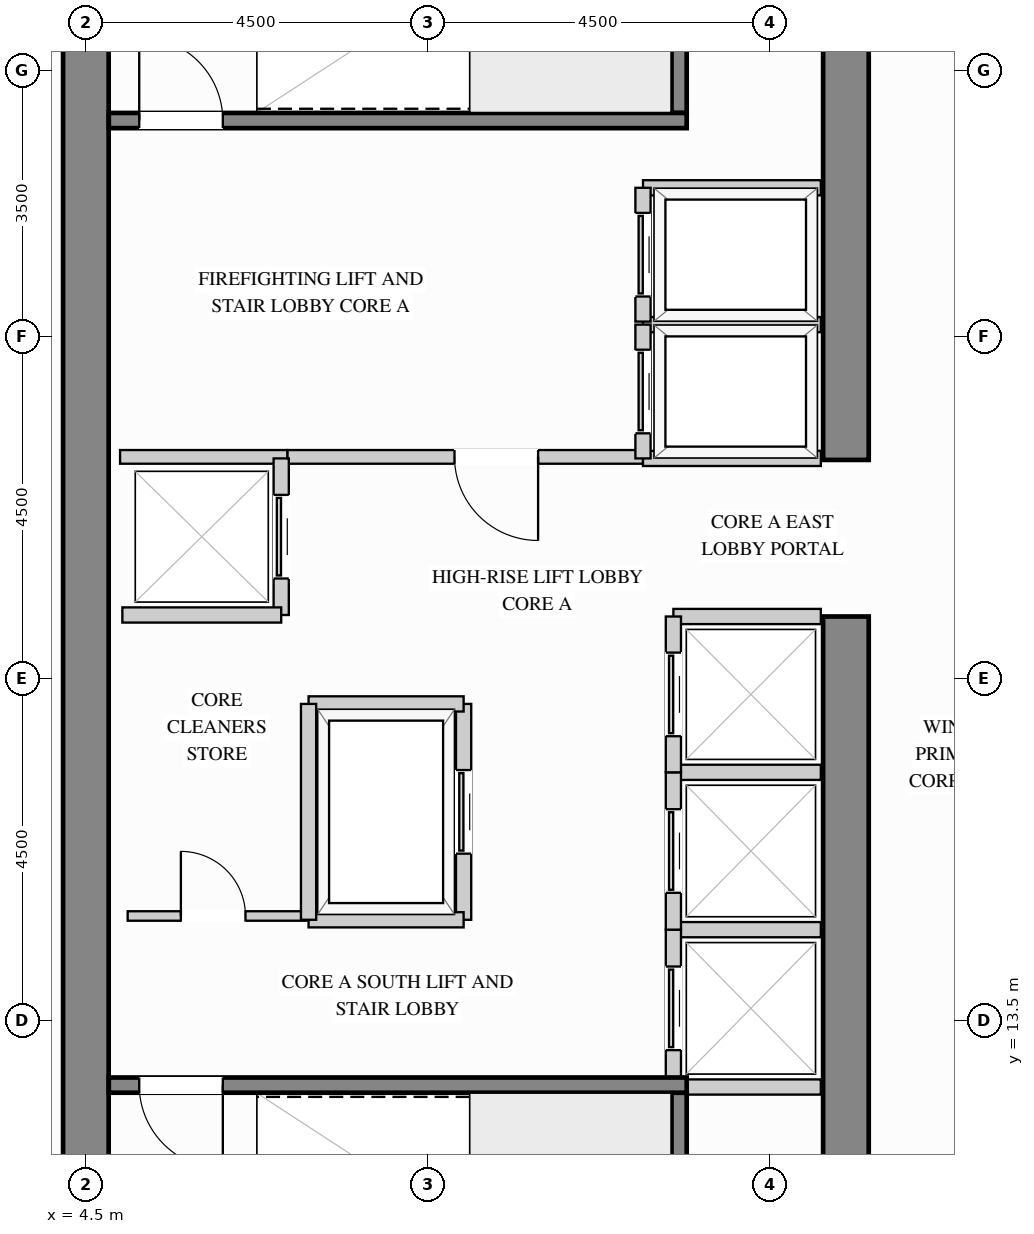
"""IFC4 building model, lengths in metres.
Left out: names, types, materials, properties, quantities, classifications, styles, units other than length and angle.
Written with IfcOpenShell. Run it as: python <this file> out.ifc"""

import sys

from ifc_helpers import new_model, si_unit, direction, frame, frame_2d, origin, place, context, subcontext, project, spatial, rectangle, extrude, source, transform, mapped, element, fill, save


model = new_model("IFC4")
c1 = context("Model", 3, precision=1e-05, world=origin(), true_north=direction((0.0, 1.0)))
c2 = subcontext(c1, "Body", "Model", "MODEL_VIEW")
j1 = project(units=[si_unit("LENGTHUNIT", "METRE"), si_unit("PLANEANGLEUNIT", "RADIAN")], contexts=[c1])
p1 = place(None, origin())
s1 = spatial("IfcSite", under=j1, at=p1, CompositionType="ELEMENT")
p2 = place(p1, origin())
s2 = spatial("IfcBuilding", under=s1, at=p2, CompositionType="ELEMENT")
p3 = place(p2, frame((0.0, 0.0, 168.3)))
s3 = spatial("IfcBuildingStorey", under=s2, at=p3, CompositionType="ELEMENT", Elevation=168.3)
m1 = source(origin(), c2, "Body", "SweptSolid", [
    extrude(rectangle(XDim=10.02, YDim=0.6, at=frame_2d((5.01, 0.0))), origin(), (0.0, 0.0, 1.0), 3.4),
])
p4 = place(p3, frame((14.5, 8.8, 0.0), z_axis=(0.0, 0.0, 1.0), x_axis=(0.0, 1.0, 0.0)))
e1 = element("IfcWall", 1, at=p4, inside=s3, PredefinedType="SHEAR", context=c2, shape_type="MappedRepresentation", body=[
    mapped(m1, transform((0.0, 0.0, 0.0), x_axis=(1.0, 0.0, 0.0), y_axis=(0.0, 1.0, 0.0), z_axis=(0.0, 0.0, 1.0))),
])
m2 = source(origin(), c2, "Body", "SweptSolid", [
    extrude(rectangle(XDim=8.32, YDim=0.6, at=frame_2d((4.16, 0.0))), origin(), (0.0, 0.0, 1.0), 3.4),
])
p5 = place(p3, frame((14.5, 20.88, 0.0), z_axis=(0.0, 0.0, 1.0), x_axis=(0.0, 1.0, 0.0)))
e2 = element("IfcWall", 2, at=p5, inside=s3, PredefinedType="SHEAR", context=c2, shape_type="MappedRepresentation", body=[
    mapped(m2, transform((0.0, 0.0, 0.0), x_axis=(1.0, 0.0, 0.0), y_axis=(0.0, 1.0, 0.0), z_axis=(0.0, 0.0, 1.0))),
])
m3 = source(origin(), c2, "Body", "SweptSolid", [
    extrude(rectangle(XDim=20.4, YDim=0.6, at=frame_2d((10.2, 0.0))), origin(), (0.0, 0.0, 1.0), 3.4),
])
p6 = place(p3, frame((4.5, 8.8, 0.0), z_axis=(0.0, 0.0, 1.0), x_axis=(0.0, 1.0, 0.0)))
e3 = element("IfcWall", 3, at=p6, inside=s3, PredefinedType="SHEAR", context=c2, shape_type="MappedRepresentation", body=[
    mapped(m3, transform((0.0, 0.0, 0.0), x_axis=(1.0, 0.0, 0.0), y_axis=(0.0, 1.0, 0.0), z_axis=(0.0, 0.0, 1.0))),
])
p7 = place(p3, frame((7.15, 20.92, 0.0), z_axis=(0.0, 0.0, 1.0), x_axis=(1.0, 0.0, 0.0)))
e4 = element("IfcWall", 4, at=p7, inside=s3, PredefinedType="PARTITIONING", context=c2, shape_type="SweptSolid", body=[
    extrude(rectangle(XDim=4.68, YDim=0.18, at=frame_2d((2.34, 0.0))), origin(), (0.0, 0.0, 1.0), 3.385),
])
p8 = place(p7, frame((2.2, 0.0, 0.0)))
e5 = element("IfcOpeningElement", 5, at=p8, cuts=e4, PredefinedType="OPENING", context=c2, shape_type="SweptSolid", body=[
    extrude(rectangle(XDim=1.1, YDim=2.15, at=frame_2d((0.55, 1.075))), frame((0.0, 0.1, 0.0), z_axis=(0.0, -1.0, 0.0), x_axis=(1.0, 0.0, 0.0)), (0.0, 0.0, 1.0), 0.2),
])
m4 = source(origin(), c2, "Body", "SweptSolid", [
    extrude(rectangle(XDim=2.2, YDim=0.18, at=frame_2d((1.1, 0.0))), origin(), (0.0, 0.0, 1.0), 3.385),
])
p9 = place(p3, frame((4.95, 20.92, 0.0), z_axis=(0.0, 0.0, 1.0), x_axis=(1.0, 0.0, 0.0)))
e6 = element("IfcWall", 6, at=p9, inside=s3, PredefinedType="PARTITIONING", context=c2, shape_type="MappedRepresentation", body=[
    mapped(m4, transform((0.0, 0.0, 0.0), x_axis=(1.0, 0.0, 0.0), y_axis=(0.0, 1.0, 0.0), z_axis=(0.0, 0.0, 1.0))),
])
p10 = place(p3, frame((5.05, 14.88, 0.0), z_axis=(0.0, 0.0, 1.0), x_axis=(1.0, 0.0, 0.0)))
e7 = element("IfcWall", 7, at=p10, inside=s3, PredefinedType="PARTITIONING", context=c2, shape_type="SweptSolid", body=[
    extrude(rectangle(XDim=2.35, YDim=0.125, at=frame_2d((1.175, 0.0))), origin(), (0.0, 0.0, 1.0), 3.385),
])
p11 = place(p10, frame((0.7, 0.0, 0.0)))
e8 = element("IfcOpeningElement", 8, at=p11, cuts=e7, PredefinedType="OPENING", context=c2, shape_type="SweptSolid", body=[
    extrude(rectangle(XDim=0.85, YDim=2.1, at=frame_2d((0.425, 1.05))), frame((0.0, 0.073, 0.0), z_axis=(0.0, -1.0, 0.0), x_axis=(1.0, 0.0, 0.0)), (0.0, 0.0, 1.0), 0.145),
])
m5 = source(origin(), c2, "Body", "SweptSolid", [
    extrude(rectangle(XDim=2.34, YDim=0.2, at=frame_2d((1.17, 0.0))), origin(), (0.0, 0.0, 1.0), 3.385),
])
for number, where, z_axis, x_axis in (
    (9, (11.83, 22.66, 0.0), (0.0, 0.0, 1.0), (1.0, 0.0, 0.0)),
    (10, (11.83, 20.9, 0.0), (0.0, 0.0, 1.0), (1.0, 0.0, 0.0)),
):
    element("IfcWall", number, at=place(p3, frame(where, z_axis=z_axis, x_axis=x_axis)), inside=s3, PredefinedType="PARTITIONING", context=c2, shape_type="MappedRepresentation", body=[
        mapped(m5, transform((0.0, 0.0, 0.0), x_axis=(1.0, 0.0, 0.0), y_axis=(0.0, 1.0, 0.0), z_axis=(0.0, 0.0, 1.0))),
    ])
p12 = place(p3, frame((11.83, 20.9, 0.0), z_axis=(0.0, 0.0, 1.0), x_axis=(0.0, 1.0, 0.0)))
e11 = element("IfcWall", 11, at=p12, inside=s3, PredefinedType="PARTITIONING", context=c2, shape_type="SweptSolid", body=[
    extrude(rectangle(XDim=1.76, YDim=0.2, at=frame_2d((0.88, 0.0))), origin(), (0.0, 0.0, 1.0), 3.385),
])
p13 = place(p12, frame((0.33, 0.0, 0.0)))
e12 = element("IfcOpeningElement", 12, at=p13, cuts=e11, PredefinedType="OPENING", context=c2, shape_type="SweptSolid", body=[
    extrude(rectangle(XDim=1.1, YDim=2.2, at=frame_2d((0.55, 1.1))), frame((0.0, 0.11, 0.0), z_axis=(0.0, -1.0, 0.0), x_axis=(1.0, 0.0, 0.0)), (0.0, 0.0, 1.0), 0.22),
])
p14 = place(p3, frame((11.83, 24.46, 0.0), z_axis=(0.0, 0.0, 1.0), x_axis=(1.0, 0.0, 0.0)))
e13 = element("IfcWall", 13, at=p14, inside=s3, PredefinedType="PARTITIONING", context=c2, shape_type="MappedRepresentation", body=[
    mapped(m5, transform((0.0, 0.0, 0.0), x_axis=(1.0, 0.0, 0.0), y_axis=(0.0, 1.0, 0.0), z_axis=(0.0, 0.0, 1.0))),
])
p15 = place(p3, frame((11.83, 22.7, 0.0), z_axis=(0.0, 0.0, 1.0), x_axis=(0.0, 1.0, 0.0)))
e14 = element("IfcWall", 14, at=p15, inside=s3, PredefinedType="PARTITIONING", context=c2, shape_type="SweptSolid", body=[
    extrude(rectangle(XDim=1.76, YDim=0.2, at=frame_2d((0.88, 0.0))), origin(), (0.0, 0.0, 1.0), 3.385),
])
p16 = place(p15, frame((0.33, 0.0, 0.0)))
e15 = element("IfcOpeningElement", 15, at=p16, cuts=e14, PredefinedType="OPENING", context=c2, shape_type="SweptSolid", body=[
    extrude(rectangle(XDim=1.1, YDim=2.2, at=frame_2d((0.55, 1.1))), frame((0.0, 0.11, 0.0), z_axis=(0.0, -1.0, 0.0), x_axis=(1.0, 0.0, 0.0)), (0.0, 0.0, 1.0), 0.22),
])
m6 = source(origin(), c2, "Body", "SweptSolid", [
    extrude(rectangle(XDim=1.94, YDim=0.2, at=frame_2d((0.97, 0.0))), origin(), (0.0, 0.0, 1.0), 3.385),
])
for number, where, z_axis, x_axis in (
    (16, (12.23, 14.7, 0.0), (0.0, 0.0, 1.0), (1.0, 0.0, 0.0)),
    (17, (12.23, 12.63, 0.0), (0.0, 0.0, 1.0), (1.0, 0.0, 0.0)),
):
    element("IfcWall", number, at=place(p3, frame(where, z_axis=z_axis, x_axis=x_axis)), inside=s3, PredefinedType="PARTITIONING", context=c2, shape_type="MappedRepresentation", body=[
        mapped(m6, transform((0.0, 0.0, 0.0), x_axis=(1.0, 0.0, 0.0), y_axis=(0.0, 1.0, 0.0), z_axis=(0.0, 0.0, 1.0))),
    ])
p17 = place(p3, frame((12.23, 12.63, 0.0), z_axis=(0.0, 0.0, 1.0), x_axis=(0.0, 1.0, 0.0)))
e18 = element("IfcWall", 18, at=p17, inside=s3, PredefinedType="PARTITIONING", context=c2, shape_type="SweptSolid", body=[
    extrude(rectangle(XDim=2.07, YDim=0.2, at=frame_2d((1.035, 0.0))), origin(), (0.0, 0.0, 1.0), 3.385),
])
p18 = place(p17, frame((0.485, 0.0, 0.0)))
e19 = element("IfcOpeningElement", 19, at=p18, cuts=e18, PredefinedType="OPENING", context=c2, shape_type="SweptSolid", body=[
    extrude(rectangle(XDim=1.1, YDim=2.2, at=frame_2d((0.55, 1.1))), frame((0.0, 0.11, 0.0), z_axis=(0.0, -1.0, 0.0), x_axis=(1.0, 0.0, 0.0)), (0.0, 0.0, 1.0), 0.22),
])
p19 = place(p3, frame((12.23, 16.77, 0.0), z_axis=(0.0, 0.0, 1.0), x_axis=(1.0, 0.0, 0.0)))
e20 = element("IfcWall", 20, at=p19, inside=s3, PredefinedType="PARTITIONING", context=c2, shape_type="MappedRepresentation", body=[
    mapped(m6, transform((0.0, 0.0, 0.0), x_axis=(1.0, 0.0, 0.0), y_axis=(0.0, 1.0, 0.0), z_axis=(0.0, 0.0, 1.0))),
])
p20 = place(p3, frame((12.23, 14.7, 0.0), z_axis=(0.0, 0.0, 1.0), x_axis=(0.0, 1.0, 0.0)))
e21 = element("IfcWall", 21, at=p20, inside=s3, PredefinedType="PARTITIONING", context=c2, shape_type="SweptSolid", body=[
    extrude(rectangle(XDim=2.07, YDim=0.2, at=frame_2d((1.035, 0.0))), origin(), (0.0, 0.0, 1.0), 3.385),
])
p21 = place(p20, frame((0.485, 0.0, 0.0)))
e22 = element("IfcOpeningElement", 22, at=p21, cuts=e21, PredefinedType="OPENING", context=c2, shape_type="SweptSolid", body=[
    extrude(rectangle(XDim=1.1, YDim=2.2, at=frame_2d((0.55, 1.1))), frame((0.0, 0.11, 0.0), z_axis=(0.0, -1.0, 0.0), x_axis=(1.0, 0.0, 0.0)), (0.0, 0.0, 1.0), 0.22),
])
p22 = place(p3, frame((12.23, 18.82, 0.0), z_axis=(0.0, 0.0, 1.0), x_axis=(1.0, 0.0, 0.0)))
e23 = element("IfcWall", 23, at=p22, inside=s3, PredefinedType="PARTITIONING", context=c2, shape_type="MappedRepresentation", body=[
    mapped(m6, transform((0.0, 0.0, 0.0), x_axis=(1.0, 0.0, 0.0), y_axis=(0.0, 1.0, 0.0), z_axis=(0.0, 0.0, 1.0))),
])
p23 = place(p3, frame((12.23, 16.77, 0.0), z_axis=(0.0, 0.0, 1.0), x_axis=(0.0, 1.0, 0.0)))
e24 = element("IfcWall", 24, at=p23, inside=s3, PredefinedType="PARTITIONING", context=c2, shape_type="SweptSolid", body=[
    extrude(rectangle(XDim=2.05, YDim=0.2, at=frame_2d((1.025, 0.0))), origin(), (0.0, 0.0, 1.0), 3.385),
])
p24 = place(p23, frame((0.475, 0.0, 0.0)))
e25 = element("IfcOpeningElement", 25, at=p24, cuts=e24, PredefinedType="OPENING", context=c2, shape_type="SweptSolid", body=[
    extrude(rectangle(XDim=1.1, YDim=2.2, at=frame_2d((0.55, 1.1))), frame((0.0, 0.11, 0.0), z_axis=(0.0, -1.0, 0.0), x_axis=(1.0, 0.0, 0.0)), (0.0, 0.0, 1.0), 0.22),
])
p25 = place(p3, frame((7.07, 18.84, 0.0), z_axis=(0.0, 0.0, 1.0), x_axis=(0.0, 1.0, 0.0)))
e26 = element("IfcWall", 26, at=p25, inside=s3, PredefinedType="PARTITIONING", context=c2, shape_type="SweptSolid", body=[
    extrude(rectangle(XDim=2.06, YDim=0.2, at=frame_2d((1.03, 0.0))), origin(), (0.0, 0.0, 1.0), 3.385),
])
p26 = place(p25, frame((0.48, 0.0, 0.0)))
e27 = element("IfcOpeningElement", 27, at=p26, cuts=e26, PredefinedType="OPENING", context=c2, shape_type="SweptSolid", body=[
    extrude(rectangle(XDim=1.1, YDim=2.2, at=frame_2d((0.55, 1.1))), frame((0.0, 0.11, 0.0), z_axis=(0.0, -1.0, 0.0), x_axis=(1.0, 0.0, 0.0)), (0.0, 0.0, 1.0), 0.22),
])
m7 = source(origin(), c2, "Body", "SweptSolid", [
    extrude(rectangle(XDim=2.09, YDim=0.2, at=frame_2d((1.045, 0.0))), origin(), (0.0, 0.0, 1.0), 3.385),
])
p27 = place(p3, frame((4.98, 18.84, 0.0), z_axis=(0.0, 0.0, 1.0), x_axis=(1.0, 0.0, 0.0)))
e28 = element("IfcWall", 28, at=p27, inside=s3, PredefinedType="PARTITIONING", context=c2, shape_type="MappedRepresentation", body=[
    mapped(m7, transform((0.0, 0.0, 0.0), x_axis=(1.0, 0.0, 0.0), y_axis=(0.0, 1.0, 0.0), z_axis=(0.0, 0.0, 1.0))),
])
p28 = place(p3, frame((9.47, 14.83, 0.0), z_axis=(0.0, 0.0, 1.0), x_axis=(0.0, 1.0, 0.0)))
e29 = element("IfcWall", 29, at=p28, inside=s3, PredefinedType="PARTITIONING", context=c2, shape_type="SweptSolid", body=[
    extrude(rectangle(XDim=2.84, YDim=0.2, at=frame_2d((1.42, 0.0))), origin(), (0.0, 0.0, 1.0), 3.385),
])
p29 = place(p28, frame((0.87, 0.0, 0.0)))
e30 = element("IfcOpeningElement", 30, at=p29, cuts=e29, PredefinedType="OPENING", context=c2, shape_type="SweptSolid", body=[
    extrude(rectangle(XDim=1.1, YDim=2.2, at=frame_2d((0.55, 1.1))), frame((0.0, 0.11, 0.0), z_axis=(0.0, -1.0, 0.0), x_axis=(1.0, 0.0, 0.0)), (0.0, 0.0, 1.0), 0.22),
])
m8 = source(origin(), c2, "Body", "SweptSolid", [
    extrude(rectangle(XDim=2.04, YDim=0.2, at=frame_2d((1.02, 0.0))), origin(), (0.0, 0.0, 1.0), 3.385),
])
for number, where, z_axis, x_axis in (
    (31, (7.43, 17.67, 0.0), (0.0, 0.0, 1.0), (1.0, 0.0, 0.0)),
    (32, (7.43, 14.83, 0.0), (0.0, 0.0, 1.0), (1.0, 0.0, 0.0)),
):
    element("IfcWall", number, at=place(p3, frame(where, z_axis=z_axis, x_axis=x_axis)), inside=s3, PredefinedType="PARTITIONING", context=c2, shape_type="MappedRepresentation", body=[
        mapped(m8, transform((0.0, 0.0, 0.0), x_axis=(1.0, 0.0, 0.0), y_axis=(0.0, 1.0, 0.0), z_axis=(0.0, 0.0, 1.0))),
    ])
m9 = source(origin(), c2, "Body", "SweptSolid", [
    extrude(rectangle(XDim=2.84, YDim=0.2, at=frame_2d((1.42, 0.0))), origin(), (0.0, 0.0, 1.0), 3.385),
])
p30 = place(p3, frame((7.43, 14.83, 0.0), z_axis=(0.0, 0.0, 1.0), x_axis=(0.0, 1.0, 0.0)))
e33 = element("IfcWall", 33, at=p30, inside=s3, PredefinedType="PARTITIONING", context=c2, shape_type="MappedRepresentation", body=[
    mapped(m9, transform((0.0, 0.0, 0.0), x_axis=(1.0, 0.0, 0.0), y_axis=(0.0, 1.0, 0.0), z_axis=(0.0, 0.0, 1.0))),
])
m10 = source(origin(), c2, "Body", "SweptSolid", [
    extrude(rectangle(XDim=3.753, YDim=0.2, at=frame_2d((1.876, 0.0))), origin(), (0.0, 0.0, 1.0), 3.4),
])
p31 = place(p3, frame((12.305, 8.802, 0.0), z_axis=(0.0, 0.0, 1.0), x_axis=(0.0, 1.0, 0.0)))
e34 = element("IfcWall", 34, at=p31, inside=s3, PredefinedType="SHEAR", context=c2, shape_type="MappedRepresentation", body=[
    mapped(m10, transform((0.0, 0.0, 0.0), x_axis=(1.0, 0.0, 0.0), y_axis=(0.0, 1.0, 0.0), z_axis=(0.0, 0.0, 1.0))),
])
p32 = place(p3, frame((4.802, 12.655, 0.0), z_axis=(0.0, 0.0, 1.0), x_axis=(1.0, 0.0, 0.0)))
e35 = element("IfcWall", 35, at=p32, inside=s3, PredefinedType="SHEAR", context=c2, shape_type="SweptSolid", body=[
    extrude(rectangle(XDim=7.603, YDim=0.2, at=frame_2d((3.802, 0.0))), origin(), (0.0, 0.0, 1.0), 3.4),
])
p33 = place(p32, frame((0.4, 0.0, 0.0)))
e36 = element("IfcOpeningElement", 36, at=p33, cuts=e35, PredefinedType="OPENING", context=c2, shape_type="SweptSolid", body=[
    extrude(rectangle(XDim=1.1, YDim=2.15, at=frame_2d((0.55, 1.075))), frame((0.0, 0.11, 0.0), z_axis=(0.0, -1.0, 0.0), x_axis=(1.0, 0.0, 0.0)), (0.0, 0.0, 1.0), 0.22),
])
p34 = place(p3, frame((12.305, 25.445, 0.0), z_axis=(0.0, 0.0, 1.0), x_axis=(0.0, 1.0, 0.0)))
e37 = element("IfcWall", 37, at=p34, inside=s3, PredefinedType="SHEAR", context=c2, shape_type="MappedRepresentation", body=[
    mapped(m10, transform((0.0, 0.0, 0.0), x_axis=(1.0, 0.0, 0.0), y_axis=(0.0, 1.0, 0.0), z_axis=(0.0, 0.0, 1.0))),
])
p35 = place(p3, frame((4.802, 25.345, 0.0), z_axis=(0.0, 0.0, 1.0), x_axis=(1.0, 0.0, 0.0)))
e38 = element("IfcWall", 38, at=p35, inside=s3, PredefinedType="SHEAR", context=c2, shape_type="SweptSolid", body=[
    extrude(rectangle(XDim=7.603, YDim=0.2, at=frame_2d((3.802, 0.0))), origin(), (0.0, 0.0, 1.0), 3.4),
])
p36 = place(p35, frame((0.4, 0.0, 0.0)))
e39 = element("IfcOpeningElement", 39, at=p36, cuts=e38, PredefinedType="OPENING", context=c2, shape_type="SweptSolid", body=[
    extrude(rectangle(XDim=1.1, YDim=2.15, at=frame_2d((0.55, 1.075))), frame((0.0, 0.11, 0.0), z_axis=(0.0, -1.0, 0.0), x_axis=(1.0, 0.0, 0.0)), (0.0, 0.0, 1.0), 0.22),
])
m11 = source(origin(), c2, "Body", "SweptSolid", [
    extrude(rectangle(XDim=1.1, YDim=2.15, at=frame_2d((0.55, 1.075))), frame((0.0, 0.025, 0.0), z_axis=(0.0, -1.0, 0.0), x_axis=(1.0, 0.0, 0.0)), (0.0, 0.0, 1.0), 0.05),
])
p37 = place(p8, origin())
e40 = element("IfcDoor", 40, at=p37, inside=s3, OperationType="SINGLE_SWING_RIGHT", PredefinedType="DOOR", context=c2, shape_type="MappedRepresentation", body=[
    mapped(m11, transform((0.0, 0.0, 0.0), x_axis=(1.0, 0.0, 0.0), y_axis=(0.0, 1.0, 0.0), z_axis=(0.0, 0.0, 1.0))),
])
fill(e5, e40)
m12 = source(origin(), c2, "Body", "SweptSolid", [
    extrude(rectangle(XDim=1.1, YDim=2.2, at=frame_2d((0.55, 1.1))), frame((0.0, 0.025, 0.0), z_axis=(0.0, -1.0, 0.0), x_axis=(1.0, 0.0, 0.0)), (0.0, 0.0, 1.0), 0.05),
])
p38 = place(p13, origin())
e41 = element("IfcDoor", 41, at=p38, inside=s3, OperationType="SLIDING_TO_LEFT", PredefinedType="DOOR", context=c2, shape_type="MappedRepresentation", body=[
    mapped(m12, transform((0.0, 0.0, 0.0), x_axis=(1.0, 0.0, 0.0), y_axis=(0.0, 1.0, 0.0), z_axis=(0.0, 0.0, 1.0))),
])
fill(e12, e41)
p39 = place(p16, origin())
e42 = element("IfcDoor", 42, at=p39, inside=s3, OperationType="SLIDING_TO_LEFT", PredefinedType="DOOR", context=c2, shape_type="MappedRepresentation", body=[
    mapped(m12, transform((0.0, 0.0, 0.0), x_axis=(1.0, 0.0, 0.0), y_axis=(0.0, 1.0, 0.0), z_axis=(0.0, 0.0, 1.0))),
])
fill(e15, e42)
p40 = place(p18, origin())
e43 = element("IfcDoor", 43, at=p40, inside=s3, OperationType="SLIDING_TO_LEFT", PredefinedType="DOOR", context=c2, shape_type="MappedRepresentation", body=[
    mapped(m12, transform((0.0, 0.0, 0.0), x_axis=(1.0, 0.0, 0.0), y_axis=(0.0, 1.0, 0.0), z_axis=(0.0, 0.0, 1.0))),
])
fill(e19, e43)
p41 = place(p21, origin())
e44 = element("IfcDoor", 44, at=p41, inside=s3, OperationType="SLIDING_TO_LEFT", PredefinedType="DOOR", context=c2, shape_type="MappedRepresentation", body=[
    mapped(m12, transform((0.0, 0.0, 0.0), x_axis=(1.0, 0.0, 0.0), y_axis=(0.0, 1.0, 0.0), z_axis=(0.0, 0.0, 1.0))),
])
fill(e22, e44)
p42 = place(p24, origin())
e45 = element("IfcDoor", 45, at=p42, inside=s3, OperationType="SLIDING_TO_LEFT", PredefinedType="DOOR", context=c2, shape_type="MappedRepresentation", body=[
    mapped(m12, transform((0.0, 0.0, 0.0), x_axis=(1.0, 0.0, 0.0), y_axis=(0.0, 1.0, 0.0), z_axis=(0.0, 0.0, 1.0))),
])
fill(e25, e45)
p43 = place(p26, origin())
e46 = element("IfcDoor", 46, at=p43, inside=s3, OperationType="SLIDING_TO_LEFT", PredefinedType="DOOR", context=c2, shape_type="MappedRepresentation", body=[
    mapped(m12, transform((0.0, 0.0, 0.0), x_axis=(1.0, 0.0, 0.0), y_axis=(0.0, 1.0, 0.0), z_axis=(0.0, 0.0, 1.0))),
])
fill(e27, e46)
p44 = place(p29, origin())
e47 = element("IfcDoor", 47, at=p44, inside=s3, OperationType="SLIDING_TO_LEFT", PredefinedType="DOOR", context=c2, shape_type="MappedRepresentation", body=[
    mapped(m12, transform((0.0, 0.0, 0.0), x_axis=(1.0, 0.0, 0.0), y_axis=(0.0, 1.0, 0.0), z_axis=(0.0, 0.0, 1.0))),
])
fill(e30, e47)
m13 = source(origin(), c2, "Body", "SweptSolid", [
    extrude(rectangle(XDim=0.85, YDim=2.1, at=frame_2d((0.425, 1.05))), frame((0.0, 0.025, 0.0), z_axis=(0.0, -1.0, 0.0), x_axis=(1.0, 0.0, 0.0)), (0.0, 0.0, 1.0), 0.05),
])
p45 = place(p11, origin())
e48 = element("IfcDoor", 48, at=p45, inside=s3, OperationType="SINGLE_SWING_LEFT", PredefinedType="DOOR", context=c2, shape_type="MappedRepresentation", body=[
    mapped(m13, transform((0.0, 0.0, 0.0), x_axis=(1.0, 0.0, 0.0), y_axis=(0.0, 1.0, 0.0), z_axis=(0.0, 0.0, 1.0))),
])
fill(e8, e48)
m14 = source(origin(), c2, "Body", "SweptSolid", [
    extrude(rectangle(XDim=1.1, YDim=2.15, at=frame_2d((0.55, 1.075))), frame((0.0, 0.025, 0.0), z_axis=(0.0, -1.0, 0.0), x_axis=(1.0, 0.0, 0.0)), (0.0, 0.0, 1.0), 0.05),
])
p46 = place(p33, origin())
e49 = element("IfcDoor", 49, at=p46, inside=s3, OperationType="SINGLE_SWING_RIGHT", PredefinedType="DOOR", context=c2, shape_type="MappedRepresentation", body=[
    mapped(m14, transform((0.0, 0.0, 0.0), x_axis=(1.0, 0.0, 0.0), y_axis=(0.0, 1.0, 0.0), z_axis=(0.0, 0.0, 1.0))),
])
fill(e36, e49)
p47 = place(p36, origin())
e50 = element("IfcDoor", 50, at=p47, inside=s3, OperationType="SINGLE_SWING_LEFT", PredefinedType="DOOR", context=c2, shape_type="MappedRepresentation", body=[
    mapped(m14, transform((0.0, 0.0, 0.0), x_axis=(1.0, 0.0, 0.0), y_axis=(0.0, 1.0, 0.0), z_axis=(0.0, 0.0, 1.0))),
])
fill(e39, e50)
save(model, sys.argv[1])
